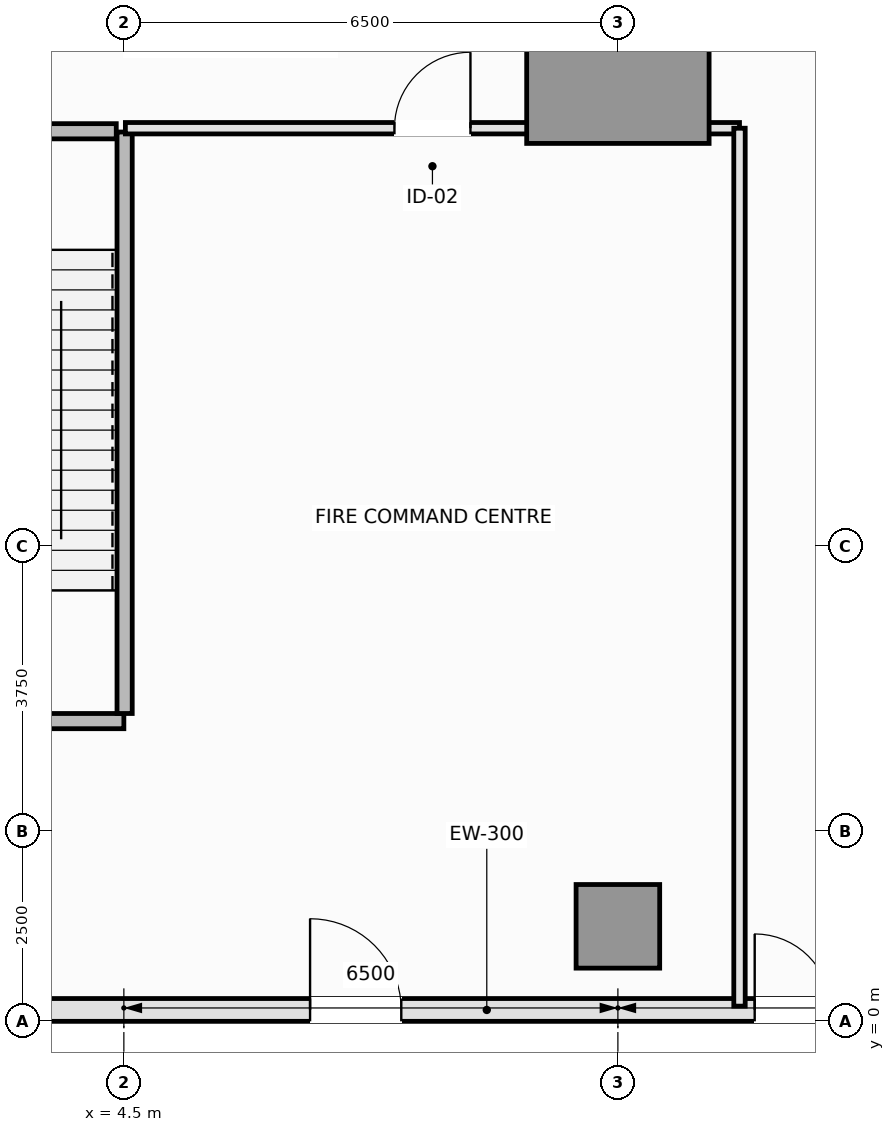
"""IFC4 building model, lengths in metres.
Left out: names, types, materials, properties, quantities, classifications, styles, units other than length and angle.
Written with IfcOpenShell. Run it as: python <this file> out.ifc"""

import sys

from ifc_helpers import new_model, si_unit, direction, frame, frame_2d, origin, origin_2d, place, context, subcontext, project, spatial, rectangle, extrude, element, fill, save


model = new_model("IFC4")
c1 = context("Model", 3, precision=1e-05, world=origin(), true_north=direction((0.0, 1.0)))
c2 = subcontext(c1, "Body", "Model", "MODEL_VIEW")
j1 = project(units=[si_unit("LENGTHUNIT", "METRE"), si_unit("PLANEANGLEUNIT", "RADIAN")], contexts=[c1])
p1 = place(None, origin())
s1 = spatial("IfcSite", under=j1, at=p1, CompositionType="ELEMENT")
p2 = place(p1, origin())
s2 = spatial("IfcBuilding", under=s1, at=p2, CompositionType="ELEMENT")
p3 = place(p2, origin())
s3 = spatial("IfcBuildingStorey", under=s2, at=p3, CompositionType="ELEMENT", Elevation=0.0)
p4 = place(p3, frame((11.0, 12.75, 0.0), z_axis=(0.0, 0.0, 1.0), x_axis=(1.0, 0.0, 0.0)))
e1 = element("IfcColumn", 1, at=p4, inside=s3, PredefinedType="COLUMN", context=c2, shape_type="SweptSolid", body=[
    extrude(rectangle(XDim=2.4, YDim=2.4, at=origin_2d()), origin(), (0.0, 0.0, 1.0), 6.0),
])
p5 = place(p3, frame((11.0, 1.25, 0.0), z_axis=(0.0, 0.0, 1.0), x_axis=(1.0, 0.0, 0.0)))
e2 = element("IfcColumn", 2, at=p5, inside=s3, PredefinedType="COLUMN", context=c2, shape_type="SweptSolid", body=[
    extrude(rectangle(XDim=1.1, YDim=1.1, at=origin_2d()), origin(), (0.0, 0.0, 1.0), 6.0),
])
p6 = place(p3, frame((0.15, 0.15, 0.0), z_axis=(0.0, 0.0, 1.0), x_axis=(1.0, 0.0, 0.0)))
e3 = element("IfcWall", 3, at=p6, inside=s3, PredefinedType="SOLIDWALL", context=c2, shape_type="SweptSolid", body=[
    extrude(rectangle(XDim=18.25, YDim=0.3, at=frame_2d((9.125, 0.0))), origin(), (0.0, 0.0, 1.0), 5.8),
])
p7 = place(p6, frame((6.8, 0.0, 0.0)))
e4 = element("IfcOpeningElement", 4, at=p7, cuts=e3, PredefinedType="OPENING", context=c2, shape_type="SweptSolid", body=[
    extrude(rectangle(XDim=1.2, YDim=2.3, at=frame_2d((0.6, 1.15))), frame((0.0, 0.16, 0.0), z_axis=(0.0, -1.0, 0.0), x_axis=(1.0, 0.0, 0.0)), (0.0, 0.0, 1.0), 0.32),
])
p8 = place(p6, frame((12.65, 0.0, 0.0)))
e5 = element("IfcOpeningElement", 5, at=p8, cuts=e3, PredefinedType="OPENING", context=c2, shape_type="SweptSolid", body=[
    extrude(rectangle(XDim=2.0, YDim=2.4, at=frame_2d((1.0, 1.2))), frame((0.0, 0.16, 0.0), z_axis=(0.0, -1.0, 0.0), x_axis=(1.0, 0.0, 0.0)), (0.0, 0.0, 1.0), 0.32),
])
p9 = place(p6, frame((15.35, 0.0, 0.0)))
e6 = element("IfcOpeningElement", 6, at=p9, cuts=e3, PredefinedType="OPENING", context=c2, shape_type="SweptSolid", body=[
    extrude(rectangle(XDim=2.0, YDim=2.4, at=frame_2d((1.0, 1.2))), frame((0.0, 0.16, 0.0), z_axis=(0.0, -1.0, 0.0), x_axis=(1.0, 0.0, 0.0)), (0.0, 0.0, 1.0), 0.32),
])
p10 = place(p3, frame((1.25, 3.95, 0.0), z_axis=(0.0, 0.0, 1.0), x_axis=(1.0, 0.0, 0.0)))
e7 = element("IfcWall", 7, at=p10, inside=s3, PredefinedType="SOLIDWALL", context=c2, shape_type="SweptSolid", body=[
    extrude(rectangle(XDim=3.25, YDim=0.2, at=frame_2d((1.625, 0.0))), origin(), (0.0, 0.0, 1.0), 6.0),
])
p11 = place(p3, frame((4.51, 4.05, 0.0), z_axis=(0.0, 0.0, 1.0), x_axis=(0.0, 1.0, 0.0)))
e8 = element("IfcWall", 8, at=p11, inside=s3, PredefinedType="SOLIDWALL", context=c2, shape_type="SweptSolid", body=[
    extrude(rectangle(XDim=7.65, YDim=0.2, at=frame_2d((3.825, 0.0))), origin(), (0.0, 0.0, 1.0), 6.0),
])
p12 = place(p3, frame((1.35, 11.71, 0.0), z_axis=(0.0, 0.0, 1.0), x_axis=(1.0, 0.0, 0.0)))
e9 = element("IfcWall", 9, at=p12, inside=s3, PredefinedType="SOLIDWALL", context=c2, shape_type="SweptSolid", body=[
    extrude(rectangle(XDim=3.05, YDim=0.2, at=frame_2d((1.525, 0.0))), origin(), (0.0, 0.0, 1.0), 6.0),
])
p13 = place(p12, frame((0.95, 0.0, 0.0)))
e10 = element("IfcOpeningElement", 10, at=p13, cuts=e9, PredefinedType="OPENING", context=c2, shape_type="SweptSolid", body=[
    extrude(rectangle(XDim=1.15, YDim=2.15, at=frame_2d((0.575, 1.075))), frame((0.0, 0.11, 0.0), z_axis=(0.0, -1.0, 0.0), x_axis=(1.0, 0.0, 0.0)), (0.0, 0.0, 1.0), 0.22),
])
p14 = place(p3, frame((4.52, 11.75, 0.0), z_axis=(0.0, 0.0, 1.0), x_axis=(1.0, 0.0, 0.0)))
e11 = element("IfcWall", 11, at=p14, inside=s3, PredefinedType="PARTITIONING", context=c2, shape_type="SweptSolid", body=[
    extrude(rectangle(XDim=8.08, YDim=0.15, at=frame_2d((4.04, 0.0))), origin(), (0.0, 0.0, 1.0), 5.8),
])
p15 = place(p14, frame((3.54, 0.0, 0.0)))
e12 = element("IfcOpeningElement", 12, at=p15, cuts=e11, PredefinedType="OPENING", context=c2, shape_type="SweptSolid", body=[
    extrude(rectangle(XDim=1.0, YDim=2.15, at=frame_2d((0.5, 1.075))), frame((0.0, 0.085, 0.0), z_axis=(0.0, -1.0, 0.0), x_axis=(1.0, 0.0, 0.0)), (0.0, 0.0, 1.0), 0.17),
])
p16 = place(p3, frame((12.6, 0.2, 0.0), z_axis=(0.0, 0.0, 1.0), x_axis=(0.0, 1.0, 0.0)))
e13 = element("IfcWall", 13, at=p16, inside=s3, PredefinedType="PARTITIONING", context=c2, shape_type="SweptSolid", body=[
    extrude(rectangle(XDim=11.55, YDim=0.15, at=frame_2d((5.775, 0.0))), origin(), (0.0, 0.0, 1.0), 5.8),
])
p17 = place(p7, frame((1.2, 0.0, 0.0), z_axis=(0.0, 0.0, 1.0), x_axis=(-1.0, 0.0, 0.0)))
e14 = element("IfcDoor", 14, at=p17, inside=s3, OperationType="SINGLE_SWING_LEFT", PredefinedType="DOOR", context=c2, shape_type="SweptSolid", body=[
    extrude(rectangle(XDim=1.2, YDim=2.3, at=frame_2d((0.6, 1.15))), frame((0.0, 0.025, 0.0), z_axis=(0.0, -1.0, 0.0), x_axis=(1.0, 0.0, 0.0)), (0.0, 0.0, 1.0), 0.05),
])
fill(e4, e14)
p18 = place(p8, frame((2.0, 0.0, 0.0), z_axis=(0.0, 0.0, 1.0), x_axis=(-1.0, 0.0, 0.0)))
e15 = element("IfcDoor", 15, at=p18, inside=s3, OperationType="DOUBLE_DOOR_SINGLE_SWING", PredefinedType="DOOR", context=c2, shape_type="SweptSolid", body=[
    extrude(rectangle(XDim=2.0, YDim=2.4, at=frame_2d((1.0, 1.2))), frame((0.0, 0.025, 0.0), z_axis=(0.0, -1.0, 0.0), x_axis=(1.0, 0.0, 0.0)), (0.0, 0.0, 1.0), 0.05),
])
fill(e5, e15)
p19 = place(p15, origin())
e16 = element("IfcDoor", 16, at=p19, inside=s3, OperationType="SINGLE_SWING_RIGHT", PredefinedType="DOOR", context=c2, shape_type="SweptSolid", body=[
    extrude(rectangle(XDim=1.0, YDim=2.15, at=frame_2d((0.5, 1.075))), frame((0.0, 0.025, 0.0), z_axis=(0.0, -1.0, 0.0), x_axis=(1.0, 0.0, 0.0)), (0.0, 0.0, 1.0), 0.05),
])
fill(e12, e16)
save(model, sys.argv[1])
